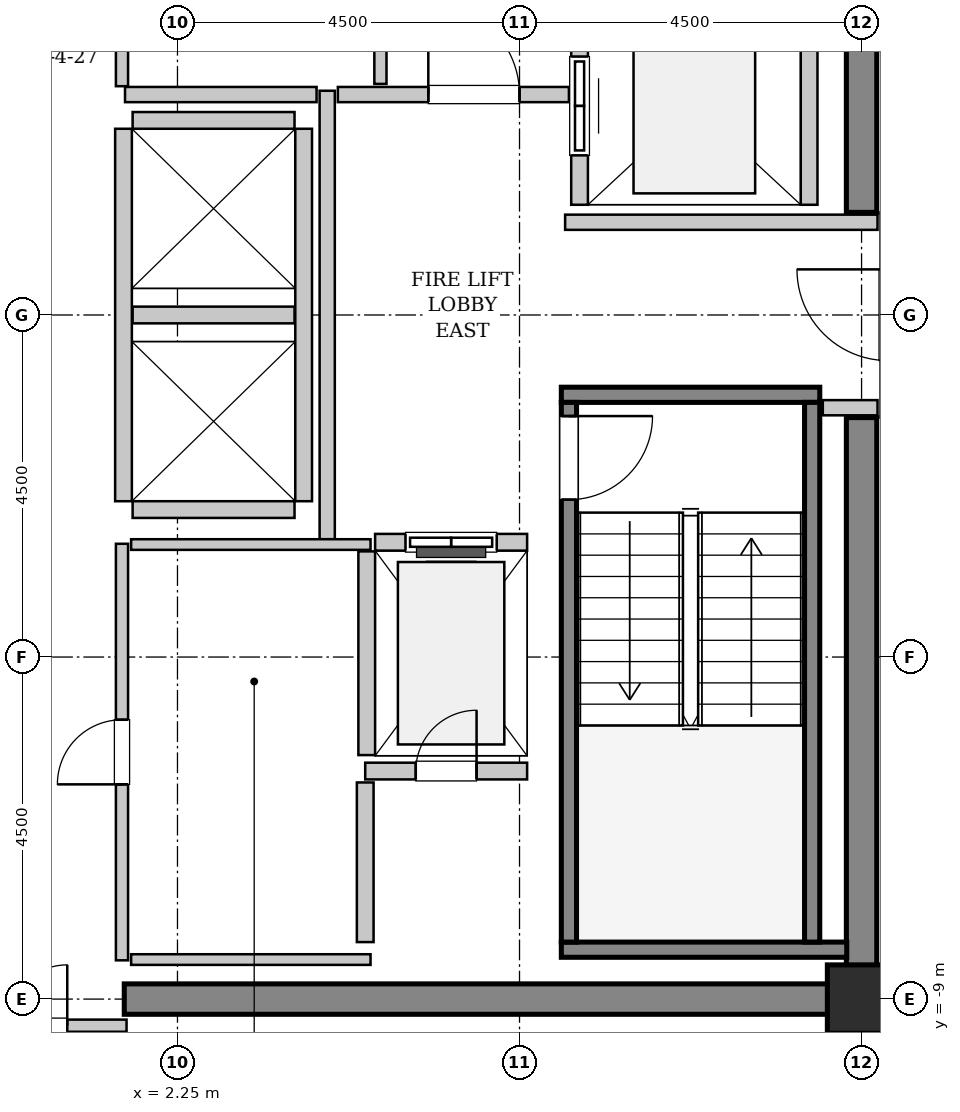
"""IFC4 building model, lengths in metres.
Left out: names, types, materials, properties, quantities, classifications, styles, units other than length and angle.
Written with IfcOpenShell. Run it as: python <this file> out.ifc"""

import sys

from ifc_helpers import new_model, si_unit, direction, frame, frame_2d, origin, origin_2d, place, context, subcontext, project, spatial, rectangle, extrude, source, transform, mapped, element, fill, save


model = new_model("IFC4")
c1 = context("Model", 3, precision=1e-05, world=origin(), true_north=direction((0.0, 1.0)))
c2 = subcontext(c1, "Body", "Model", "MODEL_VIEW")
j1 = project(units=[si_unit("LENGTHUNIT", "METRE"), si_unit("PLANEANGLEUNIT", "RADIAN")], contexts=[c1])
p1 = place(None, origin())
s1 = spatial("IfcSite", under=j1, at=p1, CompositionType="ELEMENT")
p2 = place(p1, origin())
s2 = spatial("IfcBuilding", under=s1, at=p2, CompositionType="ELEMENT")
p3 = place(p2, frame((0.0, 0.0, 341.4)))
s3 = spatial("IfcBuildingStorey", under=s2, at=p3, CompositionType="ELEMENT", Elevation=341.4)
m1 = source(origin(), c2, "Body", "SweptSolid", [
    extrude(rectangle(XDim=9.9, YDim=0.4, at=frame_2d((4.95, 0.0))), origin(), (0.0, 0.0, 1.0), 3.8),
])
p4 = place(p3, frame((1.55, -9.0, 0.0), z_axis=(0.0, 0.0, 1.0), x_axis=(1.0, 0.0, 0.0)))
e1 = element("IfcWall", 1, at=p4, inside=s3, PredefinedType="SHEAR", context=c2, shape_type="MappedRepresentation", body=[
    mapped(m1, transform((0.0, 0.0, 0.0), x_axis=(1.0, 0.0, 0.0), y_axis=(0.0, 1.0, 0.0), z_axis=(0.0, 0.0, 1.0), scale=1.0)),
])
m2 = source(origin(), c2, "Body", "SweptSolid", [
    extrude(rectangle(XDim=7.45, YDim=0.4, at=frame_2d((3.725, 0.0))), origin(), (0.0, 0.0, 1.0), 3.8),
])
for number, where, z_axis, x_axis in (
    (2, (11.25, -8.8, 0.0), (0.0, 0.0, 1.0), (0.0, 1.0, 0.0)),
    (3, (11.25, 1.35, 0.0), (0.0, 0.0, 1.0), (0.0, 1.0, 0.0)),
):
    element("IfcWall", number, at=place(p3, frame(where, z_axis=z_axis, x_axis=x_axis)), inside=s3, PredefinedType="SHEAR", context=c2, shape_type="MappedRepresentation", body=[
        mapped(m2, transform((0.0, 0.0, 0.0), x_axis=(1.0, 0.0, 0.0), y_axis=(0.0, 1.0, 0.0), z_axis=(0.0, 0.0, 1.0), scale=1.0)),
    ])
m3 = source(origin(), c2, "Body", "SweptSolid", [
    extrude(rectangle(XDim=0.9, YDim=0.9, at=origin_2d()), origin(), (0.0, 0.0, 1.0), 3.8),
])
p5 = place(p3, frame((11.25, -9.0, 0.0), z_axis=(0.0, 0.0, 1.0), x_axis=(1.0, 0.0, 0.0)))
e4 = element("IfcColumn", 4, at=p5, inside=s3, PredefinedType="COLUMN", context=c2, shape_type="MappedRepresentation", body=[
    mapped(m3, transform((0.0, 0.0, 0.0), x_axis=(1.0, 0.0, 0.0), y_axis=(0.0, 1.0, 0.0), z_axis=(0.0, 0.0, 1.0), scale=1.0)),
])
m4 = source(origin(), c2, "Body", "SweptSolid", [
    extrude(rectangle(XDim=3.4, YDim=0.2, at=frame_2d((1.7, 0.0))), origin(), (0.0, 0.0, 1.0), 3.8),
])
p6 = place(p3, frame((7.3, -1.05, 0.0), z_axis=(0.0, 0.0, 1.0), x_axis=(1.0, 0.0, 0.0)))
e5 = element("IfcWall", 5, at=p6, inside=s3, PredefinedType="SOLIDWALL", context=c2, shape_type="MappedRepresentation", body=[
    mapped(m4, transform((0.0, 0.0, 0.0), x_axis=(1.0, 0.0, 0.0), y_axis=(0.0, 1.0, 0.0), z_axis=(0.0, 0.0, 1.0), scale=1.0)),
])
m5 = source(origin(), c2, "Body", "SweptSolid", [
    extrude(rectangle(XDim=3.755, YDim=0.2, at=frame_2d((1.877, 0.0))), origin(), (0.0, 0.0, 1.0), 3.8),
])
p7 = place(p3, frame((7.3, -8.35, 0.0), z_axis=(0.0, 0.0, 1.0), x_axis=(1.0, 0.0, 0.0)))
e6 = element("IfcWall", 6, at=p7, inside=s3, PredefinedType="SOLIDWALL", context=c2, shape_type="MappedRepresentation", body=[
    mapped(m5, transform((0.0, 0.0, 0.0), x_axis=(1.0, 0.0, 0.0), y_axis=(0.0, 1.0, 0.0), z_axis=(0.0, 0.0, 1.0), scale=1.0)),
])
m6 = source(origin(), c2, "Body", "SweptSolid", [
    extrude(rectangle(XDim=7.1, YDim=0.2, at=frame_2d((3.55, 0.0))), origin(), (0.0, 0.0, 1.0), 3.8),
])
p8 = place(p3, frame((7.4, -1.15, 0.0), z_axis=(0.0, 0.0, 1.0), x_axis=(0.0, -1.0, 0.0)))
e7 = element("IfcWall", 7, at=p8, inside=s3, PredefinedType="SOLIDWALL", context=c2, shape_type="MappedRepresentation", body=[
    mapped(m6, transform((0.0, 0.0, 0.0), x_axis=(1.0, 0.0, 0.0), y_axis=(0.0, 1.0, 0.0), z_axis=(0.0, 0.0, 1.0), scale=1.0)),
])
p9 = place(p8, frame((0.18, 0.0, 0.0)))
e8 = element("IfcOpeningElement", 8, at=p9, cuts=e7, PredefinedType="OPENING", context=c2, shape_type="SweptSolid", body=[
    extrude(rectangle(XDim=1.1, YDim=2.15, at=frame_2d((0.55, 1.075))), frame((0.0, 0.11, 0.0), z_axis=(0.0, -1.0, 0.0), x_axis=(1.0, 0.0, 0.0)), (0.0, 0.0, 1.0), 0.22),
])
p10 = place(p3, frame((10.6, -1.15, 0.0), z_axis=(0.0, 0.0, 1.0), x_axis=(0.0, -1.0, 0.0)))
e9 = element("IfcWall", 9, at=p10, inside=s3, PredefinedType="SOLIDWALL", context=c2, shape_type="MappedRepresentation", body=[
    mapped(m6, transform((0.0, 0.0, 0.0), x_axis=(1.0, 0.0, 0.0), y_axis=(0.0, 1.0, 0.0), z_axis=(0.0, 0.0, 1.0), scale=1.0)),
])
m7 = source(origin(), c2, "Body", "SweptSolid", [
    extrude(rectangle(XDim=2.0, YDim=0.22, at=frame_2d((1.0, 0.0))), origin(), (0.0, 0.0, 1.0), 3.535),
])
p11 = place(p3, frame((6.85, -2.99, 0.0), z_axis=(0.0, 0.0, 1.0), x_axis=(-1.0, 0.0, 0.0)))
e10 = element("IfcWall", 10, at=p11, inside=s3, PredefinedType="SOLIDWALL", context=c2, shape_type="MappedRepresentation", body=[
    mapped(m7, transform((0.0, 0.0, 0.0), x_axis=(1.0, 0.0, 0.0), y_axis=(0.0, 1.0, 0.0), z_axis=(0.0, 0.0, 1.0), scale=1.0)),
])
p12 = place(p11, frame((0.4, 0.0, 0.0)))
e11 = element("IfcOpeningElement", 11, at=p12, cuts=e10, PredefinedType="OPENING", context=c2, shape_type="SweptSolid", body=[
    extrude(rectangle(XDim=1.2, YDim=2.2, at=frame_2d((0.6, 1.1))), frame((0.0, 0.12, 0.0), z_axis=(0.0, -1.0, 0.0), x_axis=(1.0, 0.0, 0.0)), (0.0, 0.0, 1.0), 0.24),
])
m8 = source(origin(), c2, "Body", "SweptSolid", [
    extrude(rectangle(XDim=2.68, YDim=0.22, at=frame_2d((1.34, 0.0))), origin(), (0.0, 0.0, 1.0), 3.535),
])
p13 = place(p3, frame((4.74, -3.11, 0.0), z_axis=(0.0, 0.0, 1.0), x_axis=(0.0, -1.0, 0.0)))
e12 = element("IfcWall", 12, at=p13, inside=s3, PredefinedType="SOLIDWALL", context=c2, shape_type="MappedRepresentation", body=[
    mapped(m8, transform((0.0, 0.0, 0.0), x_axis=(1.0, 0.0, 0.0), y_axis=(0.0, 1.0, 0.0), z_axis=(0.0, 0.0, 1.0), scale=1.0)),
])
m9 = source(origin(), c2, "Body", "SweptSolid", [
    extrude(rectangle(XDim=5.45, YDim=0.22, at=frame_2d((2.725, 0.0))), origin(), (0.0, 0.0, 1.0), 3.535),
])
p14 = place(p3, frame((7.54, 6.9, 0.0), z_axis=(0.0, 0.0, 1.0), x_axis=(0.0, -1.0, 0.0)))
e13 = element("IfcWall", 13, at=p14, inside=s3, PredefinedType="SOLIDWALL", context=c2, shape_type="MappedRepresentation", body=[
    mapped(m9, transform((0.0, 0.0, 0.0), x_axis=(1.0, 0.0, 0.0), y_axis=(0.0, 1.0, 0.0), z_axis=(0.0, 0.0, 1.0), scale=1.0)),
])
p15 = place(p14, frame((3.5, 0.0, 0.0)))
e14 = element("IfcOpeningElement", 14, at=p15, cuts=e13, PredefinedType="OPENING", context=c2, shape_type="SweptSolid", body=[
    extrude(rectangle(XDim=1.3, YDim=2.3, at=frame_2d((0.65, 1.15))), frame((0.0, 0.12, 0.0), z_axis=(0.0, -1.0, 0.0), x_axis=(1.0, 0.0, 0.0)), (0.0, 0.0, 1.0), 0.24),
])
p16 = place(p14, frame((0.65, 0.0, 0.0)))
e15 = element("IfcOpeningElement", 15, at=p16, cuts=e13, PredefinedType="OPENING", context=c2, shape_type="SweptSolid", body=[
    extrude(rectangle(XDim=1.3, YDim=2.3, at=frame_2d((0.65, 1.15))), frame((0.0, 0.12, 0.0), z_axis=(0.0, -1.0, 0.0), x_axis=(1.0, 0.0, 0.0)), (0.0, 0.0, 1.0), 0.24),
])
p17 = place(p3, frame((10.56, 1.45, 0.0), z_axis=(0.0, 0.0, 1.0), x_axis=(0.0, 1.0, 0.0)))
e16 = element("IfcWall", 16, at=p17, inside=s3, PredefinedType="SOLIDWALL", context=c2, shape_type="MappedRepresentation", body=[
    mapped(m9, transform((0.0, 0.0, 0.0), x_axis=(1.0, 0.0, 0.0), y_axis=(0.0, 1.0, 0.0), z_axis=(0.0, 0.0, 1.0), scale=1.0)),
])
m10 = source(origin(), c2, "Body", "SweptSolid", [
    extrude(rectangle(XDim=4.9, YDim=0.22, at=frame_2d((2.45, 0.0))), origin(), (0.0, 0.0, 1.0), 3.535),
])
for number, where, z_axis, x_axis in (
    (17, (1.54, 2.45, 0.0), (0.0, 0.0, 1.0), (0.0, -1.0, 0.0)),
    (18, (3.91, -2.45, 0.0), (0.0, 0.0, 1.0), (0.0, 1.0, 0.0)),
):
    element("IfcWall", number, at=place(p3, frame(where, z_axis=z_axis, x_axis=x_axis)), inside=s3, PredefinedType="SOLIDWALL", context=c2, shape_type="MappedRepresentation", body=[
        mapped(m10, transform((0.0, 0.0, 0.0), x_axis=(1.0, 0.0, 0.0), y_axis=(0.0, 1.0, 0.0), z_axis=(0.0, 0.0, 1.0), scale=1.0)),
    ])
m11 = source(origin(), c2, "Body", "SweptSolid", [
    extrude(rectangle(XDim=2.13, YDim=0.22, at=frame_2d((1.065, 0.0))), origin(), (0.0, 0.0, 1.0), 3.535),
])
for number, where, z_axis, x_axis in (
    (19, (1.66, -2.56, 0.0), (0.0, 0.0, 1.0), (1.0, 0.0, 0.0)),
    (20, (1.66, 0.0, 0.0), (0.0, 0.0, 1.0), (1.0, 0.0, 0.0)),
    (21, (3.79, 2.56, 0.0), (0.0, 0.0, 1.0), (-1.0, 0.0, 0.0)),
):
    element("IfcWall", number, at=place(p3, frame(where, z_axis=z_axis, x_axis=x_axis)), inside=s3, PredefinedType="SOLIDWALL", context=c2, shape_type="MappedRepresentation", body=[
        mapped(m11, transform((0.0, 0.0, 0.0), x_axis=(1.0, 0.0, 0.0), y_axis=(0.0, 1.0, 0.0), z_axis=(0.0, 0.0, 1.0), scale=1.0)),
    ])
p18 = place(p3, frame((4.72, -6.0, 0.0), z_axis=(0.0, 0.0, 1.0), x_axis=(1.0, 0.0, 0.0)))
e22 = element("IfcWall", 22, at=p18, inside=s3, PredefinedType="SOLIDWALL", context=c2, shape_type="MappedRepresentation", body=[
    mapped(m11, transform((0.0, 0.0, 0.0), x_axis=(1.0, 0.0, 0.0), y_axis=(0.0, 1.0, 0.0), z_axis=(0.0, 0.0, 1.0), scale=1.0)),
])
p19 = place(p18, frame((0.665, 0.0, 0.0)))
e23 = element("IfcOpeningElement", 23, at=p19, cuts=e22, PredefinedType="OPENING", context=c2, shape_type="SweptSolid", body=[
    extrude(rectangle(XDim=0.8, YDim=2.0, at=frame_2d((0.4, 1.0))), frame((0.0, 0.12, 0.0), z_axis=(0.0, -1.0, 0.0), x_axis=(1.0, 0.0, 0.0)), (0.0, 0.0, 1.0), 0.24),
])
m12 = source(origin(), c2, "Body", "SweptSolid", [
    extrude(rectangle(XDim=2.1, YDim=0.22, at=frame_2d((1.05, 0.0))), origin(), (0.0, 0.0, 1.0), 3.535),
])
p20 = place(p3, frame((4.72, -8.25, 0.0), z_axis=(0.0, 0.0, 1.0), x_axis=(0.0, 1.0, 0.0)))
e24 = element("IfcWall", 24, at=p20, inside=s3, PredefinedType="SOLIDWALL", context=c2, shape_type="MappedRepresentation", body=[
    mapped(m12, transform((0.0, 0.0, 0.0), x_axis=(1.0, 0.0, 0.0), y_axis=(0.0, 1.0, 0.0), z_axis=(0.0, 0.0, 1.0), scale=1.0)),
])
m13 = source(origin(), c2, "Body", "SweptSolid", [
    extrude(rectangle(XDim=5.9, YDim=0.2, at=frame_2d((2.95, 0.0))), origin(), (0.0, 0.0, 1.0), 3.535),
])
p21 = place(p3, frame((4.22, -2.95, 0.0), z_axis=(0.0, 0.0, 1.0), x_axis=(0.0, 1.0, 0.0)))
e25 = element("IfcWall", 25, at=p21, inside=s3, PredefinedType="PARTITIONING", context=c2, shape_type="MappedRepresentation", body=[
    mapped(m13, transform((0.0, 0.0, 0.0), x_axis=(1.0, 0.0, 0.0), y_axis=(0.0, 1.0, 0.0), z_axis=(0.0, 0.0, 1.0), scale=1.0)),
])
m14 = source(origin(), c2, "Body", "SweptSolid", [
    extrude(rectangle(XDim=2.52, YDim=0.2, at=frame_2d((1.26, 0.0))), origin(), (0.0, 0.0, 1.0), 3.535),
])
p22 = place(p3, frame((1.56, 2.9, 0.0), z_axis=(0.0, 0.0, 1.0), x_axis=(1.0, 0.0, 0.0)))
e26 = element("IfcWall", 26, at=p22, inside=s3, PredefinedType="PARTITIONING", context=c2, shape_type="MappedRepresentation", body=[
    mapped(m14, transform((0.0, 0.0, 0.0), x_axis=(1.0, 0.0, 0.0), y_axis=(0.0, 1.0, 0.0), z_axis=(0.0, 0.0, 1.0), scale=1.0)),
])
m15 = source(origin(), c2, "Body", "SweptSolid", [
    extrude(rectangle(XDim=3.04, YDim=0.2, at=frame_2d((1.52, 0.0))), origin(), (0.0, 0.0, 1.0), 3.535),
])
p23 = place(p3, frame((4.36, 2.9, 0.0), z_axis=(0.0, 0.0, 1.0), x_axis=(1.0, 0.0, 0.0)))
e27 = element("IfcWall", 27, at=p23, inside=s3, PredefinedType="PARTITIONING", context=c2, shape_type="MappedRepresentation", body=[
    mapped(m15, transform((0.0, 0.0, 0.0), x_axis=(1.0, 0.0, 0.0), y_axis=(0.0, 1.0, 0.0), z_axis=(0.0, 0.0, 1.0), scale=1.0)),
])
p24 = place(p23, frame((1.19, 0.0, 0.0)))
e28 = element("IfcOpeningElement", 28, at=p24, cuts=e27, PredefinedType="OPENING", context=c2, shape_type="SweptSolid", body=[
    extrude(rectangle(XDim=1.2, YDim=2.15, at=frame_2d((0.6, 1.075))), frame((0.0, 0.11, 0.0), z_axis=(0.0, -1.0, 0.0), x_axis=(1.0, 0.0, 0.0)), (0.0, 0.0, 1.0), 0.22),
])
m16 = source(origin(), c2, "Body", "SweptSolid", [
    extrude(rectangle(XDim=4.11, YDim=0.2, at=frame_2d((2.055, 0.0))), origin(), (0.0, 0.0, 1.0), 3.535),
])
p25 = place(p3, frame((7.35, 1.22, 0.0), z_axis=(0.0, 0.0, 1.0), x_axis=(1.0, 0.0, 0.0)))
e29 = element("IfcWall", 29, at=p25, inside=s3, PredefinedType="PARTITIONING", context=c2, shape_type="MappedRepresentation", body=[
    mapped(m16, transform((0.0, 0.0, 0.0), x_axis=(1.0, 0.0, 0.0), y_axis=(0.0, 1.0, 0.0), z_axis=(0.0, 0.0, 1.0), scale=1.0)),
])
m17 = source(origin(), c2, "Body", "SweptSolid", [
    extrude(rectangle(XDim=0.72, YDim=0.2, at=frame_2d((0.36, 0.0))), origin(), (0.0, 0.0, 1.0), 3.535),
])
p26 = place(p3, frame((10.74, -1.22, 0.0), z_axis=(0.0, 0.0, 1.0), x_axis=(1.0, 0.0, 0.0)))
e30 = element("IfcWall", 30, at=p26, inside=s3, PredefinedType="PARTITIONING", context=c2, shape_type="MappedRepresentation", body=[
    mapped(m17, transform((0.0, 0.0, 0.0), x_axis=(1.0, 0.0, 0.0), y_axis=(0.0, 1.0, 0.0), z_axis=(0.0, 0.0, 1.0), scale=1.0)),
])
m18 = source(origin(), c2, "Body", "SweptSolid", [
    extrude(rectangle(XDim=3.16, YDim=0.16, at=frame_2d((1.58, 0.0))), origin(), (0.0, 0.0, 1.0), 2.625),
])
p27 = place(p3, frame((-1.58, -9.35, 0.0), z_axis=(0.0, 0.0, 1.0), x_axis=(1.0, 0.0, 0.0)))
e31 = element("IfcWall", 31, at=p27, inside=s3, PredefinedType="PARTITIONING", context=c2, shape_type="MappedRepresentation", body=[
    mapped(m18, transform((0.0, 0.0, 0.0), x_axis=(1.0, 0.0, 0.0), y_axis=(0.0, 1.0, 0.0), z_axis=(0.0, 0.0, 1.0), scale=1.0)),
])
p28 = place(p27, frame((0.78, 0.0, 0.0)))
e32 = element("IfcOpeningElement", 32, at=p28, cuts=e31, PredefinedType="OPENING", context=c2, shape_type="SweptSolid", body=[
    extrude(rectangle(XDim=1.6, YDim=2.3, at=frame_2d((0.8, 1.15))), frame((0.0, 0.09, 0.0), z_axis=(0.0, -1.0, 0.0), x_axis=(1.0, 0.0, 0.0)), (0.0, 0.0, 1.0), 0.18),
])
m19 = source(origin(), c2, "Body", "SweptSolid", [
    extrude(rectangle(XDim=5.45, YDim=0.16, at=frame_2d((2.725, 0.0))), origin(), (0.0, 0.0, 1.0), 3.535),
])
p29 = place(p3, frame((4.92, 3.04, 0.0), z_axis=(0.0, 0.0, 1.0), x_axis=(0.0, 1.0, 0.0)))
e33 = element("IfcWall", 33, at=p29, inside=s3, PredefinedType="PARTITIONING", context=c2, shape_type="MappedRepresentation", body=[
    mapped(m19, transform((0.0, 0.0, 0.0), x_axis=(1.0, 0.0, 0.0), y_axis=(0.0, 1.0, 0.0), z_axis=(0.0, 0.0, 1.0), scale=1.0)),
])
m20 = source(origin(), c2, "Body", "SweptSolid", [
    extrude(rectangle(XDim=5.48, YDim=0.16, at=frame_2d((2.74, 0.0))), origin(), (0.0, 0.0, 1.0), 3.535),
])
p30 = place(p3, frame((1.52, 3.01, 0.0), z_axis=(0.0, 0.0, 1.0), x_axis=(0.0, 1.0, 0.0)))
e34 = element("IfcWall", 34, at=p30, inside=s3, PredefinedType="PARTITIONING", context=c2, shape_type="MappedRepresentation", body=[
    mapped(m20, transform((0.0, 0.0, 0.0), x_axis=(1.0, 0.0, 0.0), y_axis=(0.0, 1.0, 0.0), z_axis=(0.0, 0.0, 1.0), scale=1.0)),
])
p31 = place(p30, frame((2.315, 0.0, 0.0)))
e35 = element("IfcOpeningElement", 35, at=p31, cuts=e34, PredefinedType="OPENING", context=c2, shape_type="SweptSolid", body=[
    extrude(rectangle(XDim=0.85, YDim=2.1, at=frame_2d((0.425, 1.05))), frame((0.0, 0.09, 0.0), z_axis=(0.0, -1.0, 0.0), x_axis=(1.0, 0.0, 0.0)), (0.0, 0.0, 1.0), 0.18),
])
p32 = place(p3, frame((1.52, -8.49, 0.0), z_axis=(0.0, 0.0, 1.0), x_axis=(0.0, 1.0, 0.0)))
e36 = element("IfcWall", 36, at=p32, inside=s3, PredefinedType="PARTITIONING", context=c2, shape_type="MappedRepresentation", body=[
    mapped(m20, transform((0.0, 0.0, 0.0), x_axis=(1.0, 0.0, 0.0), y_axis=(0.0, 1.0, 0.0), z_axis=(0.0, 0.0, 1.0), scale=1.0)),
])
p33 = place(p32, frame((2.315, 0.0, 0.0)))
e37 = element("IfcOpeningElement", 37, at=p33, cuts=e36, PredefinedType="OPENING", context=c2, shape_type="SweptSolid", body=[
    extrude(rectangle(XDim=0.85, YDim=2.1, at=frame_2d((0.425, 1.05))), frame((0.0, 0.09, 0.0), z_axis=(0.0, -1.0, 0.0), x_axis=(1.0, 0.0, 0.0)), (0.0, 0.0, 1.0), 0.18),
])
m21 = source(origin(), c2, "Body", "SweptSolid", [
    extrude(rectangle(XDim=3.15, YDim=0.14, at=frame_2d((1.575, 0.0))), origin(), (0.0, 0.0, 1.0), 3.535),
])
for number, where, z_axis, x_axis in (
    (38, (1.64, -3.02, 0.0), (0.0, 0.0, 1.0), (1.0, 0.0, 0.0)),
    (39, (1.64, -8.48, 0.0), (0.0, 0.0, 1.0), (1.0, 0.0, 0.0)),
):
    element("IfcWall", number, at=place(p3, frame(where, z_axis=z_axis, x_axis=x_axis)), inside=s3, PredefinedType="PARTITIONING", context=c2, shape_type="MappedRepresentation", body=[
        mapped(m21, transform((0.0, 0.0, 0.0), x_axis=(1.0, 0.0, 0.0), y_axis=(0.0, 1.0, 0.0), z_axis=(0.0, 0.0, 1.0), scale=1.0)),
    ])
m22 = source(origin(), c2, "Body", "SweptSolid", [
    extrude(rectangle(XDim=1.1, YDim=2.15, at=frame_2d((0.55, 1.075))), frame((0.0, 0.025, 0.0), z_axis=(0.0, -1.0, 0.0), x_axis=(1.0, 0.0, 0.0)), (0.0, 0.0, 1.0), 0.05),
])
p34 = place(p9, origin())
e40 = element("IfcDoor", 40, at=p34, inside=s3, OperationType="SINGLE_SWING_LEFT", PredefinedType="DOOR", context=c2, shape_type="MappedRepresentation", body=[
    mapped(m22, transform((0.0, 0.0, 0.0), x_axis=(1.0, 0.0, 0.0), y_axis=(0.0, 1.0, 0.0), z_axis=(0.0, 0.0, 1.0), scale=1.0)),
])
fill(e8, e40)
m23 = source(origin(), c2, "Body", "SweptSolid", [
    extrude(rectangle(XDim=1.2, YDim=2.2, at=frame_2d((0.6, 1.1))), frame((0.0, 0.025, 0.0), z_axis=(0.0, -1.0, 0.0), x_axis=(1.0, 0.0, 0.0)), (0.0, 0.0, 1.0), 0.05),
])
p35 = place(p12, origin())
e41 = element("IfcDoor", 41, at=p35, inside=s3, OperationType="SLIDING_TO_LEFT", PredefinedType="DOOR", context=c2, shape_type="MappedRepresentation", body=[
    mapped(m23, transform((0.0, 0.0, 0.0), x_axis=(1.0, 0.0, 0.0), y_axis=(0.0, 1.0, 0.0), z_axis=(0.0, 0.0, 1.0), scale=1.0)),
])
fill(e11, e41)
m24 = source(origin(), c2, "Body", "SweptSolid", [
    extrude(rectangle(XDim=1.3, YDim=2.3, at=frame_2d((0.65, 1.15))), frame((0.0, 0.025, 0.0), z_axis=(0.0, -1.0, 0.0), x_axis=(1.0, 0.0, 0.0)), (0.0, 0.0, 1.0), 0.05),
])
p36 = place(p15, origin())
e42 = element("IfcDoor", 42, at=p36, inside=s3, OperationType="SLIDING_TO_RIGHT", PredefinedType="DOOR", context=c2, shape_type="MappedRepresentation", body=[
    mapped(m24, transform((0.0, 0.0, 0.0), x_axis=(1.0, 0.0, 0.0), y_axis=(0.0, 1.0, 0.0), z_axis=(0.0, 0.0, 1.0), scale=1.0)),
])
fill(e14, e42)
m25 = source(origin(), c2, "Body", "SweptSolid", [
    extrude(rectangle(XDim=0.8, YDim=2.0, at=frame_2d((0.4, 1.0))), frame((0.0, 0.025, 0.0), z_axis=(0.0, -1.0, 0.0), x_axis=(1.0, 0.0, 0.0)), (0.0, 0.0, 1.0), 0.05),
])
p37 = place(p19, origin())
e43 = element("IfcDoor", 43, at=p37, inside=s3, OperationType="SINGLE_SWING_RIGHT", PredefinedType="TRAPDOOR", context=c2, shape_type="MappedRepresentation", body=[
    mapped(m25, transform((0.0, 0.0, 0.0), x_axis=(1.0, 0.0, 0.0), y_axis=(0.0, 1.0, 0.0), z_axis=(0.0, 0.0, 1.0), scale=1.0)),
])
fill(e23, e43)
m26 = source(origin(), c2, "Body", "SweptSolid", [
    extrude(rectangle(XDim=1.2, YDim=2.15, at=frame_2d((0.6, 1.075))), frame((0.0, 0.025, 0.0), z_axis=(0.0, -1.0, 0.0), x_axis=(1.0, 0.0, 0.0)), (0.0, 0.0, 1.0), 0.05),
])
p38 = place(p24, origin())
e44 = element("IfcDoor", 44, at=p38, inside=s3, OperationType="SINGLE_SWING_LEFT", PredefinedType="DOOR", context=c2, shape_type="MappedRepresentation", body=[
    mapped(m26, transform((0.0, 0.0, 0.0), x_axis=(1.0, 0.0, 0.0), y_axis=(0.0, 1.0, 0.0), z_axis=(0.0, 0.0, 1.0), scale=1.0)),
])
fill(e28, e44)
m27 = source(origin(), c2, "Body", "SweptSolid", [
    extrude(rectangle(XDim=1.6, YDim=2.3, at=frame_2d((0.8, 1.15))), frame((0.0, 0.025, 0.0), z_axis=(0.0, -1.0, 0.0), x_axis=(1.0, 0.0, 0.0)), (0.0, 0.0, 1.0), 0.05),
])
p39 = place(p28, origin())
e45 = element("IfcDoor", 45, at=p39, inside=s3, OperationType="DOUBLE_DOOR_SINGLE_SWING", PredefinedType="DOOR", context=c2, shape_type="MappedRepresentation", body=[
    mapped(m27, transform((0.0, 0.0, 0.0), x_axis=(1.0, 0.0, 0.0), y_axis=(0.0, 1.0, 0.0), z_axis=(0.0, 0.0, 1.0), scale=1.0)),
])
fill(e32, e45)
m28 = source(origin(), c2, "Body", "SweptSolid", [
    extrude(rectangle(XDim=0.85, YDim=2.1, at=frame_2d((0.425, 1.05))), frame((0.0, 0.025, 0.0), z_axis=(0.0, -1.0, 0.0), x_axis=(1.0, 0.0, 0.0)), (0.0, 0.0, 1.0), 0.05),
])
p40 = place(p33, origin())
e46 = element("IfcDoor", 46, at=p40, inside=s3, OperationType="SINGLE_SWING_LEFT", PredefinedType="DOOR", context=c2, shape_type="MappedRepresentation", body=[
    mapped(m28, transform((0.0, 0.0, 0.0), x_axis=(1.0, 0.0, 0.0), y_axis=(0.0, 1.0, 0.0), z_axis=(0.0, 0.0, 1.0), scale=1.0)),
])
fill(e37, e46)
save(model, sys.argv[1])
